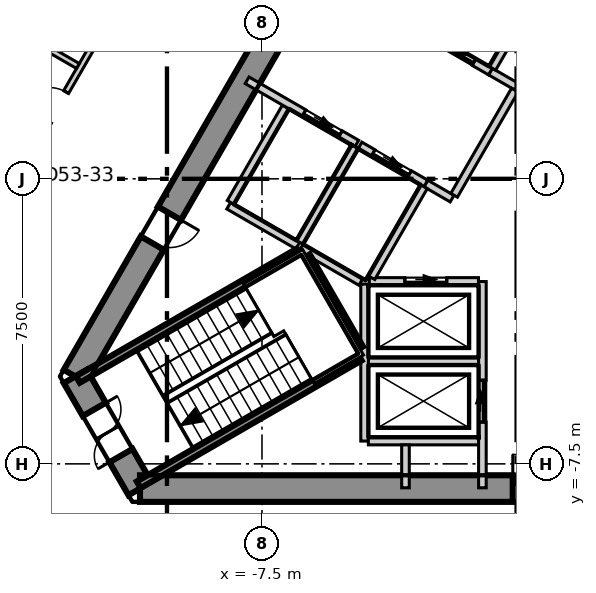
"""IFC4 building model, lengths in metres.
Left out: names, types, materials, properties, quantities, classifications, styles, units other than length and angle.
Written with IfcOpenShell. Run it as: python <this file> out.ifc"""

import sys

from ifc_helpers import new_model, si_unit, direction, frame, frame_2d, origin, place, context, subcontext, project, spatial, polyline, rectangle, outline, extrude, element, fill, save


model = new_model("IFC4")
c1 = context("Model", 3, precision=1e-05, world=origin(), true_north=direction((0.0, 1.0)))
c2 = subcontext(c1, "Body", "Model", "MODEL_VIEW")
j1 = project(units=[si_unit("LENGTHUNIT", "METRE"), si_unit("PLANEANGLEUNIT", "RADIAN")], contexts=[c1])
p1 = place(None, origin())
s1 = spatial("IfcSite", under=j1, at=p1, CompositionType="ELEMENT")
p2 = place(p1, origin())
s2 = spatial("IfcBuilding", under=s1, at=p2, CompositionType="ELEMENT")
p3 = place(p2, frame((0.0, 0.0, 227.3)))
s3 = spatial("IfcBuildingStorey", under=s2, at=p3, CompositionType="ELEMENT", Elevation=227.3)
p4 = place(p3, frame((-1.703, 13.35, -0.3), z_axis=(0.0, 0.0, 1.0), x_axis=(-0.500011533395, -0.866018744874, 0.0)))
e1 = element("IfcWall", 1, at=p4, inside=s3, PredefinedType="SHEAR", context=c2, shape_type="SweptSolid", body=[
    extrude(outline(polyline([(-0.202, -0.35), (1.782, -0.35), (3.766, -0.35), (5.75, -0.35), (7.734, -0.35), (9.718, -0.35), (11.702, -0.35), (13.686, -0.35), (15.67, -0.35), (17.654, -0.35), (19.638, -0.35), (21.622, -0.35), (21.218, 0.35), (19.307, 0.35), (17.397, 0.35), (15.486, 0.35), (13.576, 0.35), (11.665, 0.35), (9.755, 0.35), (7.844, 0.35), (5.934, 0.35), (4.023, 0.35), (2.113, 0.35), (0.202, 0.35), (-0.202, -0.35)])), origin(), (0.0, 0.0, 1.0), 4.0),
])
p5 = place(p4, frame((10.16, 0.0, 0.3)))
e2 = element("IfcOpeningElement", 2, at=p5, cuts=e1, PredefinedType="OPENING", context=c2, shape_type="SweptSolid", body=[
    extrude(rectangle(XDim=1.1, YDim=2.1, at=frame_2d((0.55, 1.05))), frame((0.0, 0.36, 0.0), z_axis=(0.0, -1.0, 0.0), x_axis=(1.0, 0.0, 0.0)), (0.0, 0.0, 1.0), 0.72),
])
p6 = place(p4, frame((16.465, 0.0, 0.3)))
e3 = element("IfcOpeningElement", 3, at=p6, cuts=e1, PredefinedType="OPENING", context=c2, shape_type="SweptSolid", body=[
    extrude(rectangle(XDim=0.9, YDim=2.1, at=frame_2d((0.45, 1.05))), frame((0.0, 0.36, 0.0), z_axis=(0.0, -1.0, 0.0), x_axis=(1.0, 0.0, 0.0)), (0.0, 0.0, 1.0), 0.72),
])
p7 = place(p4, frame((4.055, 0.0, 0.3)))
e4 = element("IfcOpeningElement", 4, at=p7, cuts=e1, PredefinedType="OPENING", context=c2, shape_type="SweptSolid", body=[
    extrude(rectangle(XDim=0.9, YDim=2.1, at=frame_2d((0.45, 1.05))), frame((0.0, 0.36, 0.0), z_axis=(0.0, -1.0, 0.0), x_axis=(1.0, 0.0, 0.0)), (0.0, 0.0, 1.0), 0.72),
])
p8 = place(p3, frame((-12.413, -5.2, -0.3), z_axis=(0.0, 0.0, 1.0), x_axis=(0.49999337185, -0.866029230515, 0.0)))
e5 = element("IfcWall", 5, at=p8, inside=s3, PredefinedType="SHEAR", context=c2, shape_type="SweptSolid", body=[
    extrude(outline(polyline([(-0.202, -0.35), (1.703, -0.35), (3.608, -0.35), (3.204, 0.35), (1.703, 0.35), (0.202, 0.35), (-0.202, -0.35)])), origin(), (0.0, 0.0, 1.0), 4.0),
])
p9 = place(p8, frame((1.003, 0.0, 0.3)))
e6 = element("IfcOpeningElement", 6, at=p9, cuts=e5, PredefinedType="OPENING", context=c2, shape_type="SweptSolid", body=[
    extrude(rectangle(XDim=1.4, YDim=2.1, at=frame_2d((0.7, 1.05))), frame((0.0, 0.36, 0.0), z_axis=(0.0, -1.0, 0.0), x_axis=(1.0, 0.0, 0.0)), (0.0, 0.0, 1.0), 0.72),
])
p10 = place(p3, frame((-10.71, -8.15, -0.3), z_axis=(0.0, 0.0, 1.0), x_axis=(1.0, 0.0, 0.0)))
e7 = element("IfcWall", 7, at=p10, inside=s3, PredefinedType="SHEAR", context=c2, shape_type="SweptSolid", body=[
    extrude(outline(polyline([(-0.202, -0.35), (1.782, -0.35), (3.766, -0.35), (5.75, -0.35), (7.734, -0.35), (9.718, -0.35), (11.702, -0.35), (13.686, -0.35), (15.67, -0.35), (17.654, -0.35), (19.638, -0.35), (21.622, -0.35), (21.218, 0.35), (19.307, 0.35), (17.397, 0.35), (15.486, 0.35), (13.576, 0.35), (11.665, 0.35), (9.755, 0.35), (7.844, 0.35), (5.934, 0.35), (4.023, 0.35), (2.113, 0.35), (0.202, 0.35), (-0.202, -0.35)])), origin(), (0.0, 0.0, 1.0), 4.0),
])
p11 = place(p10, frame((9.81, 0.0, 0.3)))
e8 = element("IfcOpeningElement", 8, at=p11, cuts=e7, PredefinedType="OPENING", context=c2, shape_type="SweptSolid", body=[
    extrude(rectangle(XDim=1.8, YDim=2.1, at=frame_2d((0.9, 1.05))), frame((0.0, 0.36, 0.0), z_axis=(0.0, -1.0, 0.0), x_axis=(1.0, 0.0, 0.0)), (0.0, 0.0, 1.0), 0.72),
])
p12 = place(p3, frame((-2.732, 30.501, 0.0), z_axis=(0.0, 0.0, 1.0), x_axis=(-0.500023345841, -0.866011924637, 0.0)))
e9 = element("IfcWall", 9, at=p12, inside=s3, PredefinedType="ELEMENTEDWALL", context=c2, shape_type="SweptSolid", body=[
    extrude(rectangle(XDim=50.078, YDim=0.2, at=frame_2d((25.039, 0.0))), origin(), (0.0, 0.0, 1.0), 3.7),
])
p13 = place(p12, frame((2.171, 0.0, 0.9)))
e10 = element("IfcOpeningElement", 10, at=p13, cuts=e9, PredefinedType="OPENING", context=c2, shape_type="SweptSolid", body=[
    extrude(rectangle(XDim=4.2, YDim=2.5, at=frame_2d((2.1, 1.25))), frame((0.0, 0.11, 0.0), z_axis=(0.0, -1.0, 0.0), x_axis=(1.0, 0.0, 0.0)), (0.0, 0.0, 1.0), 0.22),
])
p14 = place(p12, frame((8.107, 0.0, 0.9)))
e11 = element("IfcOpeningElement", 11, at=p14, cuts=e9, PredefinedType="OPENING", context=c2, shape_type="SweptSolid", body=[
    extrude(rectangle(XDim=4.2, YDim=2.5, at=frame_2d((2.1, 1.25))), frame((0.0, 0.11, 0.0), z_axis=(0.0, -1.0, 0.0), x_axis=(1.0, 0.0, 0.0)), (0.0, 0.0, 1.0), 0.22),
])
p15 = place(p12, frame((14.044, 0.0, 0.9)))
e12 = element("IfcOpeningElement", 12, at=p15, cuts=e9, PredefinedType="OPENING", context=c2, shape_type="SweptSolid", body=[
    extrude(rectangle(XDim=4.2, YDim=2.5, at=frame_2d((2.1, 1.25))), frame((0.0, 0.11, 0.0), z_axis=(0.0, -1.0, 0.0), x_axis=(1.0, 0.0, 0.0)), (0.0, 0.0, 1.0), 0.22),
])
p16 = place(p12, frame((19.98, 0.0, 0.9)))
e13 = element("IfcOpeningElement", 13, at=p16, cuts=e9, PredefinedType="OPENING", context=c2, shape_type="SweptSolid", body=[
    extrude(rectangle(XDim=4.2, YDim=2.5, at=frame_2d((2.1, 1.25))), frame((0.0, 0.11, 0.0), z_axis=(0.0, -1.0, 0.0), x_axis=(1.0, 0.0, 0.0)), (0.0, 0.0, 1.0), 0.22),
])
p17 = place(p12, frame((25.917, 0.0, 0.9)))
e14 = element("IfcOpeningElement", 14, at=p17, cuts=e9, PredefinedType="OPENING", context=c2, shape_type="SweptSolid", body=[
    extrude(rectangle(XDim=4.2, YDim=2.5, at=frame_2d((2.1, 1.25))), frame((0.0, 0.11, 0.0), z_axis=(0.0, -1.0, 0.0), x_axis=(1.0, 0.0, 0.0)), (0.0, 0.0, 1.0), 0.22),
])
p18 = place(p12, frame((31.853, 0.0, 0.9)))
e15 = element("IfcOpeningElement", 15, at=p18, cuts=e9, PredefinedType="OPENING", context=c2, shape_type="SweptSolid", body=[
    extrude(rectangle(XDim=4.2, YDim=2.5, at=frame_2d((2.1, 1.25))), frame((0.0, 0.11, 0.0), z_axis=(0.0, -1.0, 0.0), x_axis=(1.0, 0.0, 0.0)), (0.0, 0.0, 1.0), 0.22),
])
p19 = place(p12, frame((37.79, 0.0, 0.9)))
e16 = element("IfcOpeningElement", 16, at=p19, cuts=e9, PredefinedType="OPENING", context=c2, shape_type="SweptSolid", body=[
    extrude(rectangle(XDim=4.2, YDim=2.5, at=frame_2d((2.1, 1.25))), frame((0.0, 0.11, 0.0), z_axis=(0.0, -1.0, 0.0), x_axis=(1.0, 0.0, 0.0)), (0.0, 0.0, 1.0), 0.22),
])
p20 = place(p12, frame((43.726, 0.0, 0.9)))
e17 = element("IfcOpeningElement", 17, at=p20, cuts=e9, PredefinedType="OPENING", context=c2, shape_type="SweptSolid", body=[
    extrude(rectangle(XDim=4.2, YDim=2.5, at=frame_2d((2.1, 1.25))), frame((0.0, 0.11, 0.0), z_axis=(0.0, -1.0, 0.0), x_axis=(1.0, 0.0, 0.0)), (0.0, 0.0, 1.0), 0.22),
])
p21 = place(p3, frame((-20.882, -11.969, 0.0), z_axis=(0.0, 0.0, 1.0), x_axis=(0.499998738735, 0.866026131975, 0.0)))
e18 = element("IfcWall", 18, at=p21, inside=s3, PredefinedType="PARTITIONING", context=c2, shape_type="SweptSolid", body=[
    extrude(rectangle(XDim=41.764, YDim=0.15, at=frame_2d((20.882, 0.0))), origin(), (0.0, 0.0, 1.0), 3.7),
])
p22 = place(p21, frame((33.714, 0.0, 0.0)))
e19 = element("IfcOpeningElement", 19, at=p22, cuts=e18, PredefinedType="OPENING", context=c2, shape_type="SweptSolid", body=[
    extrude(rectangle(XDim=1.1, YDim=2.1, at=frame_2d((0.55, 1.05))), frame((0.0, 0.085, 0.0), z_axis=(0.0, -1.0, 0.0), x_axis=(1.0, 0.0, 0.0)), (0.0, 0.0, 1.0), 0.17),
])
p23 = place(p21, frame((23.293, 0.0, 0.0)))
e20 = element("IfcOpeningElement", 20, at=p23, cuts=e18, PredefinedType="OPENING", context=c2, shape_type="SweptSolid", body=[
    extrude(rectangle(XDim=1.0, YDim=2.1, at=frame_2d((0.5, 1.05))), frame((0.0, 0.085, 0.0), z_axis=(0.0, -1.0, 0.0), x_axis=(1.0, 0.0, 0.0)), (0.0, 0.0, 1.0), 0.17),
])
p24 = place(p21, frame((13.356, 0.0, 0.0)))
e21 = element("IfcOpeningElement", 21, at=p24, cuts=e18, PredefinedType="OPENING", context=c2, shape_type="SweptSolid", body=[
    extrude(rectangle(XDim=1.1, YDim=2.1, at=frame_2d((0.55, 1.05))), frame((0.0, 0.085, 0.0), z_axis=(0.0, -1.0, 0.0), x_axis=(1.0, 0.0, 0.0)), (0.0, 0.0, 1.0), 0.17),
])
p25 = place(p21, frame((18.556, 0.0, 0.0)))
e22 = element("IfcOpeningElement", 22, at=p25, cuts=e18, PredefinedType="OPENING", context=c2, shape_type="SweptSolid", body=[
    extrude(rectangle(XDim=0.9, YDim=2.1, at=frame_2d((0.45, 1.05))), frame((0.0, 0.085, 0.0), z_axis=(0.0, -1.0, 0.0), x_axis=(1.0, 0.0, 0.0)), (0.0, 0.0, 1.0), 0.17),
])
p26 = place(p21, frame((15.556, 0.0, 0.0)))
e23 = element("IfcOpeningElement", 23, at=p26, cuts=e18, PredefinedType="OPENING", context=c2, shape_type="SweptSolid", body=[
    extrude(rectangle(XDim=0.9, YDim=2.1, at=frame_2d((0.45, 1.05))), frame((0.0, 0.085, 0.0), z_axis=(0.0, -1.0, 0.0), x_axis=(1.0, 0.0, 0.0)), (0.0, 0.0, 1.0), 0.17),
])
p27 = place(p21, frame((3.883, 0.0, 0.0)))
e24 = element("IfcOpeningElement", 24, at=p27, cuts=e18, PredefinedType="OPENING", context=c2, shape_type="SweptSolid", body=[
    extrude(rectangle(XDim=1.1, YDim=2.1, at=frame_2d((0.55, 1.05))), frame((0.0, 0.085, 0.0), z_axis=(0.0, -1.0, 0.0), x_axis=(1.0, 0.0, 0.0)), (0.0, 0.0, 1.0), 0.17),
])
p28 = place(p3, frame((-15.868, 2.233, 0.0), z_axis=(0.0, 0.0, 1.0), x_axis=(0.499932914044, 0.866064132415, 0.0)))
e25 = element("IfcWall", 25, at=p28, inside=s3, PredefinedType="PARTITIONING", context=c2, shape_type="SweptSolid", body=[
    extrude(rectangle(XDim=5.925, YDim=0.15, at=frame_2d((2.962, 0.0))), origin(), (0.0, 0.0, 1.0), 3.7),
])
p29 = place(p3, frame((-14.603, 4.273, 0.0), z_axis=(0.0, 0.0, 1.0), x_axis=(0.8660749285, -0.499914210863, 0.0)))
e26 = element("IfcWall", 26, at=p29, inside=s3, PredefinedType="PARTITIONING", context=c2, shape_type="SweptSolid", body=[
    extrude(rectangle(XDim=2.608, YDim=0.15, at=frame_2d((1.304, 0.0))), origin(), (0.0, 0.0, 1.0), 3.7),
])
p30 = place(p3, frame((-8.376, -0.707, 0.0), z_axis=(0.0, 0.0, 1.0), x_axis=(0.866067520717, -0.499927044236, 0.0)))
e27 = element("IfcWall", 27, at=p30, inside=s3, PredefinedType="SOLIDWALL", context=c2, shape_type="SweptSolid", body=[
    extrude(rectangle(XDim=2.1, YDim=0.2, at=frame_2d((1.05, 0.0))), origin(), (0.0, 0.0, 1.0), 3.7),
])
p31 = place(p3, frame((-8.326, -0.62, 0.0), z_axis=(0.0, 0.0, 1.0), x_axis=(0.500023687443, 0.866011727401, 0.0)))
e28 = element("IfcWall", 28, at=p31, inside=s3, PredefinedType="SOLIDWALL", context=c2, shape_type="SweptSolid", body=[
    extrude(rectangle(XDim=2.9, YDim=0.2, at=frame_2d((1.45, 0.0))), origin(), (0.0, 0.0, 1.0), 3.7),
])
p32 = place(p3, frame((-4.7, -4.8, 0.0), z_axis=(0.0, 0.0, 1.0), x_axis=(1.0, 0.0, 0.0)))
e29 = element("IfcWall", 29, at=p32, inside=s3, PredefinedType="SOLIDWALL", context=c2, shape_type="SweptSolid", body=[
    extrude(rectangle(XDim=2.9, YDim=0.2, at=frame_2d((1.45, 0.0))), origin(), (0.0, 0.0, 1.0), 3.7),
])
p33 = place(p3, frame((-4.8, -6.9, 0.0), z_axis=(0.0, 0.0, 1.0), x_axis=(0.0, 1.0, 0.0)))
e30 = element("IfcWall", 30, at=p33, inside=s3, PredefinedType="SOLIDWALL", context=c2, shape_type="SweptSolid", body=[
    extrude(rectangle(XDim=4.131, YDim=0.2, at=frame_2d((2.065, 0.0))), origin(), (0.0, 0.0, 1.0), 3.7),
])
p34 = place(p3, frame((-4.7, -6.9, 0.0), z_axis=(0.0, 0.0, 1.0), x_axis=(1.0, 0.0, 0.0)))
e31 = element("IfcWall", 31, at=p34, inside=s3, PredefinedType="SOLIDWALL", context=c2, shape_type="SweptSolid", body=[
    extrude(rectangle(XDim=2.9, YDim=0.2, at=frame_2d((1.45, 0.0))), origin(), (0.0, 0.0, 1.0), 3.7),
])
p35 = place(p3, frame((-1.7, -8.13, 0.0), z_axis=(0.0, 0.0, 1.0), x_axis=(0.0, 1.0, 0.0)))
e32 = element("IfcWall", 32, at=p35, inside=s3, PredefinedType="SOLIDWALL", context=c2, shape_type="SweptSolid", body=[
    extrude(rectangle(XDim=5.427, YDim=0.2, at=frame_2d((2.713, 0.0))), origin(), (0.0, 0.0, 1.0), 3.7),
])
p36 = place(p35, frame((1.73, 0.0, 0.0)))
e33 = element("IfcOpeningElement", 33, at=p36, cuts=e32, PredefinedType="OPENING", context=c2, shape_type="SweptSolid", body=[
    extrude(rectangle(XDim=1.1, YDim=2.1, at=frame_2d((0.55, 1.05))), frame((0.0, 0.11, 0.0), z_axis=(0.0, -1.0, 0.0), x_axis=(1.0, 0.0, 0.0)), (0.0, 0.0, 1.0), 0.22),
])
p37 = place(p3, frame((-4.676, -2.7, 0.0), z_axis=(0.0, 0.0, 1.0), x_axis=(1.0, 0.0, 0.0)))
e34 = element("IfcWall", 34, at=p37, inside=s3, PredefinedType="SOLIDWALL", context=c2, shape_type="SweptSolid", body=[
    extrude(rectangle(XDim=2.873, YDim=0.2, at=frame_2d((1.437, 0.0))), origin(), (0.0, 0.0, 1.0), 3.7),
])
p38 = place(p37, frame((0.937, 0.0, 0.0)))
e35 = element("IfcOpeningElement", 35, at=p38, cuts=e34, PredefinedType="OPENING", context=c2, shape_type="SweptSolid", body=[
    extrude(rectangle(XDim=1.1, YDim=2.1, at=frame_2d((0.55, 1.05))), frame((0.0, 0.11, 0.0), z_axis=(0.0, -1.0, 0.0), x_axis=(1.0, 0.0, 0.0)), (0.0, 0.0, 1.0), 0.22),
])
p39 = place(p3, frame((-7.891, 2.593, 0.0), z_axis=(0.0, 0.0, 1.0), x_axis=(0.866070917804, -0.499921159118, 0.0)))
e36 = element("IfcWall", 36, at=p39, inside=s3, PredefinedType="SOLIDWALL", context=c2, shape_type="SweptSolid", body=[
    extrude(rectangle(XDim=3.333, YDim=0.2, at=frame_2d((1.666, 0.0))), origin(), (0.0, 0.0, 1.0), 3.7),
])
p40 = place(p39, frame((1.73, 0.0, 0.0)))
e37 = element("IfcOpeningElement", 37, at=p40, cuts=e36, PredefinedType="OPENING", context=c2, shape_type="SweptSolid", body=[
    extrude(rectangle(XDim=1.1, YDim=2.1, at=frame_2d((0.55, 1.05))), frame((0.0, 0.11, 0.0), z_axis=(0.0, -1.0, 0.0), x_axis=(1.0, 0.0, 0.0)), (0.0, 0.0, 1.0), 0.22),
])
p41 = place(p3, frame((-3.188, -0.122, 0.0), z_axis=(0.0, 0.0, 1.0), x_axis=(0.865705793592, -0.50055317294, 0.0)))
e38 = element("IfcWall", 38, at=p41, inside=s3, PredefinedType="SOLIDWALL", context=c2, shape_type="SweptSolid", body=[
    extrude(rectangle(XDim=0.797, YDim=0.2, at=frame_2d((0.398, 0.0))), origin(), (0.0, 0.0, 1.0), 3.7),
])
p42 = place(p3, frame((-1.488, 2.822, 0.0), z_axis=(0.0, 0.0, 1.0), x_axis=(0.866236612152, -0.499633997809, 0.0)))
e39 = element("IfcWall", 39, at=p42, inside=s3, PredefinedType="SOLIDWALL", context=c2, shape_type="SweptSolid", body=[
    extrude(rectangle(XDim=0.796, YDim=0.2, at=frame_2d((0.398, 0.0))), origin(), (0.0, 0.0, 1.0), 3.7),
])
p43 = place(p3, frame((-2.444, -0.433, 0.0), z_axis=(0.0, 0.0, 1.0), x_axis=(0.500035624827, 0.866004834804, 0.0)))
e40 = element("IfcWall", 40, at=p43, inside=s3, PredefinedType="SOLIDWALL", context=c2, shape_type="SweptSolid", body=[
    extrude(rectangle(XDim=3.194, YDim=0.2, at=frame_2d((1.597, 0.0))), origin(), (0.0, 0.0, 1.0), 3.7),
])
p44 = place(p3, frame((-6.507, -1.67, 0.0), z_axis=(0.0, 0.0, 1.0), x_axis=(0.50012328804, 0.865954211699, 0.0)))
e41 = element("IfcWall", 41, at=p44, inside=s3, PredefinedType="SOLIDWALL", context=c2, shape_type="SweptSolid", body=[
    extrude(rectangle(XDim=2.9, YDim=0.2, at=frame_2d((1.45, 0.0))), origin(), (0.0, 0.0, 1.0), 3.7),
])
p45 = place(p3, frame((-6.47, -1.807, 0.0), z_axis=(0.0, 0.0, 1.0), x_axis=(0.865883195159, -0.500246231712, 0.0)))
e42 = element("IfcWall", 42, at=p45, inside=s3, PredefinedType="SOLIDWALL", context=c2, shape_type="SweptSolid", body=[
    extrude(rectangle(XDim=1.815, YDim=0.2, at=frame_2d((0.908, 0.0))), origin(), (0.0, 0.0, 1.0), 3.7),
])
p46 = place(p3, frame((-4.922, 0.879, 0.0), z_axis=(0.0, 0.0, 1.0), x_axis=(0.866073918653, -0.499915960366, 0.0)))
e43 = element("IfcWall", 43, at=p46, inside=s3, PredefinedType="SOLIDWALL", context=c2, shape_type="SweptSolid", body=[
    extrude(rectangle(XDim=2.002, YDim=0.2, at=frame_2d((1.001, 0.0))), origin(), (0.0, 0.0, 1.0), 3.7),
])
p47 = place(p46, frame((0.402, 0.0, 0.0)))
e44 = element("IfcOpeningElement", 44, at=p47, cuts=e43, PredefinedType="OPENING", context=c2, shape_type="SweptSolid", body=[
    extrude(rectangle(XDim=1.1, YDim=2.1, at=frame_2d((0.55, 1.05))), frame((0.0, 0.11, 0.0), z_axis=(0.0, -1.0, 0.0), x_axis=(1.0, 0.0, 0.0)), (0.0, 0.0, 1.0), 0.22),
])
p48 = place(p3, frame((-4.619, -2.6, 0.0), z_axis=(0.0, 0.0, 1.0), x_axis=(0.50009492287, 0.865970593103, 0.0)))
e45 = element("IfcWall", 45, at=p48, inside=s3, PredefinedType="SOLIDWALL", context=c2, shape_type="SweptSolid", body=[
    extrude(rectangle(XDim=2.761, YDim=0.2, at=frame_2d((1.381, 0.0))), origin(), (0.0, 0.0, 1.0), 3.7),
])
p49 = place(p3, frame((-3.309, 3.873, 0.0), z_axis=(0.0, 0.0, 1.0), x_axis=(0.866098583652, -0.499873227325, 0.0)))
e46 = element("IfcWall", 46, at=p49, inside=s3, PredefinedType="SOLIDWALL", context=c2, shape_type="SweptSolid", body=[
    extrude(rectangle(XDim=2.103, YDim=0.2, at=frame_2d((1.051, 0.0))), origin(), (0.0, 0.0, 1.0), 3.7),
])
p50 = place(p49, frame((0.502, 0.0, 0.0)))
e47 = element("IfcOpeningElement", 47, at=p50, cuts=e46, PredefinedType="OPENING", context=c2, shape_type="SweptSolid", body=[
    extrude(rectangle(XDim=1.1, YDim=2.1, at=frame_2d((0.55, 1.05))), frame((0.0, 0.11, 0.0), z_axis=(0.0, -1.0, 0.0), x_axis=(1.0, 0.0, 0.0)), (0.0, 0.0, 1.0), 0.22),
])
p51 = place(p3, frame((-1.438, 2.909, 0.0), z_axis=(0.0, 0.0, 1.0), x_axis=(0.499829630636, 0.866123744241, 0.0)))
e48 = element("IfcWall", 48, at=p51, inside=s3, PredefinedType="SOLIDWALL", context=c2, shape_type="SweptSolid", body=[
    extrude(rectangle(XDim=2.761, YDim=0.2, at=frame_2d((1.38, 0.0))), origin(), (0.0, 0.0, 1.0), 3.7),
])
p52 = place(p3, frame((-3.724, -8.13, 0.0), z_axis=(0.0, 0.0, 1.0), x_axis=(0.0, 1.0, 0.0)))
e49 = element("IfcWall", 49, at=p52, inside=s3, PredefinedType="SOLIDWALL", context=c2, shape_type="SweptSolid", body=[
    extrude(rectangle(XDim=1.13, YDim=0.2, at=frame_2d((0.565, 0.0))), origin(), (0.0, 0.0, 1.0), 3.7),
])
p53 = place(p3, frame((-12.344, -5.279, 0.0), z_axis=(0.0, 0.0, 1.0), x_axis=(0.866046323291, 0.499963764601, 0.0)))
e50 = element("IfcWall", 50, at=p53, inside=s3, PredefinedType="SOLIDWALL", context=c2, shape_type="SweptSolid", body=[
    extrude(rectangle(XDim=6.714, YDim=0.2, at=frame_2d((3.357, 0.0))), origin(), (0.0, 0.0, 1.0), 3.7),
])
p54 = place(p3, frame((-6.329, -2.038, 0.0), z_axis=(0.0, 0.0, 1.0), x_axis=(0.500200581029, -0.865909567298, 0.0)))
e51 = element("IfcWall", 51, at=p54, inside=s3, PredefinedType="SOLIDWALL", context=c2, shape_type="SweptSolid", body=[
    extrude(rectangle(XDim=2.799, YDim=0.2, at=frame_2d((1.399, 0.0))), origin(), (0.0, 0.0, 1.0), 3.7),
])
p55 = place(p3, frame((-10.744, -8.051, 0.0), z_axis=(0.0, 0.0, 1.0), x_axis=(0.865983344943, 0.500072840975, 0.0)))
e52 = element("IfcWall", 52, at=p55, inside=s3, PredefinedType="SOLIDWALL", context=c2, shape_type="SweptSolid", body=[
    extrude(rectangle(XDim=6.715, YDim=0.2, at=frame_2d((3.357, 0.0))), origin(), (0.0, 0.0, 1.0), 3.7),
])
p56 = place(p38, origin())
e53 = element("IfcDoor", 53, at=p56, inside=s3, OperationType="SLIDING_TO_LEFT", PredefinedType="DOOR", context=c2, shape_type="SweptSolid", body=[
    extrude(rectangle(XDim=1.1, YDim=2.1, at=frame_2d((0.55, 1.05))), frame((0.0, 0.025, 0.0), z_axis=(0.0, -1.0, 0.0), x_axis=(1.0, 0.0, 0.0)), (0.0, 0.0, 1.0), 0.05),
])
fill(e35, e53)
p57 = place(p36, origin())
e54 = element("IfcDoor", 54, at=p57, inside=s3, OperationType="SLIDING_TO_LEFT", PredefinedType="DOOR", context=c2, shape_type="SweptSolid", body=[
    extrude(rectangle(XDim=1.1, YDim=2.1, at=frame_2d((0.55, 1.05))), frame((0.0, 0.025, 0.0), z_axis=(0.0, -1.0, 0.0), x_axis=(1.0, 0.0, 0.0)), (0.0, 0.0, 1.0), 0.05),
])
fill(e33, e54)
p58 = place(p47, origin())
e55 = element("IfcDoor", 55, at=p58, inside=s3, OperationType="SLIDING_TO_LEFT", PredefinedType="DOOR", context=c2, shape_type="SweptSolid", body=[
    extrude(rectangle(XDim=1.1, YDim=2.1, at=frame_2d((0.55, 1.05))), frame((0.0, 0.025, 0.0), z_axis=(0.0, -1.0, 0.0), x_axis=(1.0, 0.0, 0.0)), (0.0, 0.0, 1.0), 0.05),
])
fill(e44, e55)
p59 = place(p50, origin())
e56 = element("IfcDoor", 56, at=p59, inside=s3, OperationType="SLIDING_TO_LEFT", PredefinedType="DOOR", context=c2, shape_type="SweptSolid", body=[
    extrude(rectangle(XDim=1.1, YDim=2.1, at=frame_2d((0.55, 1.05))), frame((0.0, 0.025, 0.0), z_axis=(0.0, -1.0, 0.0), x_axis=(1.0, 0.0, 0.0)), (0.0, 0.0, 1.0), 0.05),
])
fill(e47, e56)
p60 = place(p40, origin())
e57 = element("IfcDoor", 57, at=p60, inside=s3, OperationType="SLIDING_TO_LEFT", PredefinedType="DOOR", context=c2, shape_type="SweptSolid", body=[
    extrude(rectangle(XDim=1.1, YDim=2.1, at=frame_2d((0.55, 1.05))), frame((0.0, 0.025, 0.0), z_axis=(0.0, -1.0, 0.0), x_axis=(1.0, 0.0, 0.0)), (0.0, 0.0, 1.0), 0.05),
])
fill(e37, e57)
p61 = place(p26, origin())
e58 = element("IfcDoor", 58, at=p61, inside=s3, OperationType="SINGLE_SWING_RIGHT", PredefinedType="DOOR", context=c2, shape_type="SweptSolid", body=[
    extrude(rectangle(XDim=0.9, YDim=2.1, at=frame_2d((0.45, 1.05))), frame((0.0, 0.025, 0.0), z_axis=(0.0, -1.0, 0.0), x_axis=(1.0, 0.0, 0.0)), (0.0, 0.0, 1.0), 0.05),
])
fill(e23, e58)
p62 = place(p11, origin())
e59 = element("IfcDoor", 59, at=p62, inside=s3, OperationType="DOUBLE_DOOR_SINGLE_SWING", PredefinedType="DOOR", context=c2, shape_type="SweptSolid", body=[
    extrude(rectangle(XDim=1.8, YDim=2.1, at=frame_2d((0.9, 1.05))), frame((0.0, 0.025, 0.0), z_axis=(0.0, -1.0, 0.0), x_axis=(1.0, 0.0, 0.0)), (0.0, 0.0, 1.0), 0.05),
])
fill(e8, e59)
p63 = place(p9, origin())
e60 = element("IfcDoor", 60, at=p63, inside=s3, OperationType="DOUBLE_DOOR_SINGLE_SWING", PredefinedType="DOOR", context=c2, shape_type="SweptSolid", body=[
    extrude(rectangle(XDim=1.4, YDim=2.1, at=frame_2d((0.7, 1.05))), frame((0.0, 0.025, 0.0), z_axis=(0.0, -1.0, 0.0), x_axis=(1.0, 0.0, 0.0)), (0.0, 0.0, 1.0), 0.05),
])
fill(e6, e60)
p64 = place(p6, origin())
e61 = element("IfcDoor", 61, at=p64, inside=s3, OperationType="SINGLE_SWING_RIGHT", PredefinedType="DOOR", context=c2, shape_type="SweptSolid", body=[
    extrude(rectangle(XDim=0.9, YDim=2.1, at=frame_2d((0.45, 1.05))), frame((0.0, 0.025, 0.0), z_axis=(0.0, -1.0, 0.0), x_axis=(1.0, 0.0, 0.0)), (0.0, 0.0, 1.0), 0.05),
])
fill(e3, e61)
save(model, sys.argv[1])
